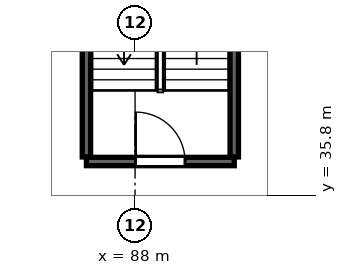
"""IFC4 building model, lengths in metres.
Left out: names, types, materials, properties, quantities, classifications, styles, units other than length and angle.
Written with IfcOpenShell. Run it as: python <this file> out.ifc"""

import sys

from ifc_helpers import new_model, si_unit, direction, frame, frame_2d, origin, place, context, subcontext, project, spatial, rectangle, extrude, source, transform, mapped, element, fill, save


model = new_model("IFC4")
c1 = context("Model", 3, precision=1e-05, world=origin(), true_north=direction((0.0, 1.0)))
c2 = subcontext(c1, "Body", "Model", "MODEL_VIEW")
j1 = project(units=[si_unit("LENGTHUNIT", "METRE"), si_unit("PLANEANGLEUNIT", "RADIAN")], contexts=[c1])
p1 = place(None, origin())
s1 = spatial("IfcSite", under=j1, at=p1, CompositionType="ELEMENT")
p2 = place(p1, origin())
s2 = spatial("IfcBuilding", under=s1, at=p2, CompositionType="ELEMENT")
p3 = place(p2, frame((0.0, 0.0, 24.0)))
s3 = spatial("IfcBuildingStorey", under=s2, at=p3, CompositionType="ELEMENT", Elevation=24.0)
m1 = source(origin(), c2, "Body", "SweptSolid", [
    extrude(rectangle(XDim=3.89, YDim=0.22, at=frame_2d((1.945, 0.0))), origin(), (0.0, 0.0, 1.0), 6.0),
])
p4 = place(p3, frame((86.72, 36.69, 0.0), z_axis=(0.0, 0.0, 1.0), x_axis=(1.0, 0.0, 0.0)))
e1 = element("IfcWall", 1, at=p4, inside=s3, PredefinedType="SOLIDWALL", context=c2, shape_type="MappedRepresentation", body=[
    mapped(m1, transform((0.0, 0.0, 0.0), scale=1.0)),
])
p5 = place(p4, frame((1.295, 0.0, 0.0)))
e2 = element("IfcOpeningElement", 2, at=p5, cuts=e1, PredefinedType="OPENING", context=c2, shape_type="SweptSolid", body=[
    extrude(rectangle(XDim=1.3, YDim=2.15, at=frame_2d((0.65, 1.075))), frame((0.0, 0.12, 0.0), z_axis=(0.0, -1.0, 0.0), x_axis=(1.0, 0.0, 0.0)), (0.0, 0.0, 1.0), 0.24),
])
m2 = source(origin(), c2, "Body", "SweptSolid", [
    extrude(rectangle(XDim=10.38, YDim=0.22, at=frame_2d((5.19, 0.0))), origin(), (0.0, 0.0, 1.0), 6.0),
])
for number, where, z_axis, x_axis in (
    (3, (86.72, 36.81, 0.0), (0.0, 0.0, 1.0), (0.0, 1.0, 0.0)),
    (4, (90.61, 36.81, 0.0), (0.0, 0.0, 1.0), (0.0, 1.0, 0.0)),
):
    element("IfcWall", number, at=place(p3, frame(where, z_axis=z_axis, x_axis=x_axis)), inside=s3, PredefinedType="SOLIDWALL", context=c2, shape_type="MappedRepresentation", body=[
        mapped(m2, transform((0.0, 0.0, 0.0), scale=1.0)),
    ])
m3 = source(origin(), c2, "Body", "SweptSolid", [
    extrude(rectangle(XDim=1.3, YDim=2.15, at=frame_2d((0.65, 1.075))), frame((0.0, 0.025, 0.0), z_axis=(0.0, -1.0, 0.0), x_axis=(1.0, 0.0, 0.0)), (0.0, 0.0, 1.0), 0.05),
])
p6 = place(p5, origin())
e5 = element("IfcDoor", 5, at=p6, inside=s3, OperationType="SINGLE_SWING_LEFT", PredefinedType="DOOR", context=c2, shape_type="MappedRepresentation", body=[
    mapped(m3, transform((0.0, 0.0, 0.0), scale=1.0)),
])
fill(e2, e5)
save(model, sys.argv[1])
